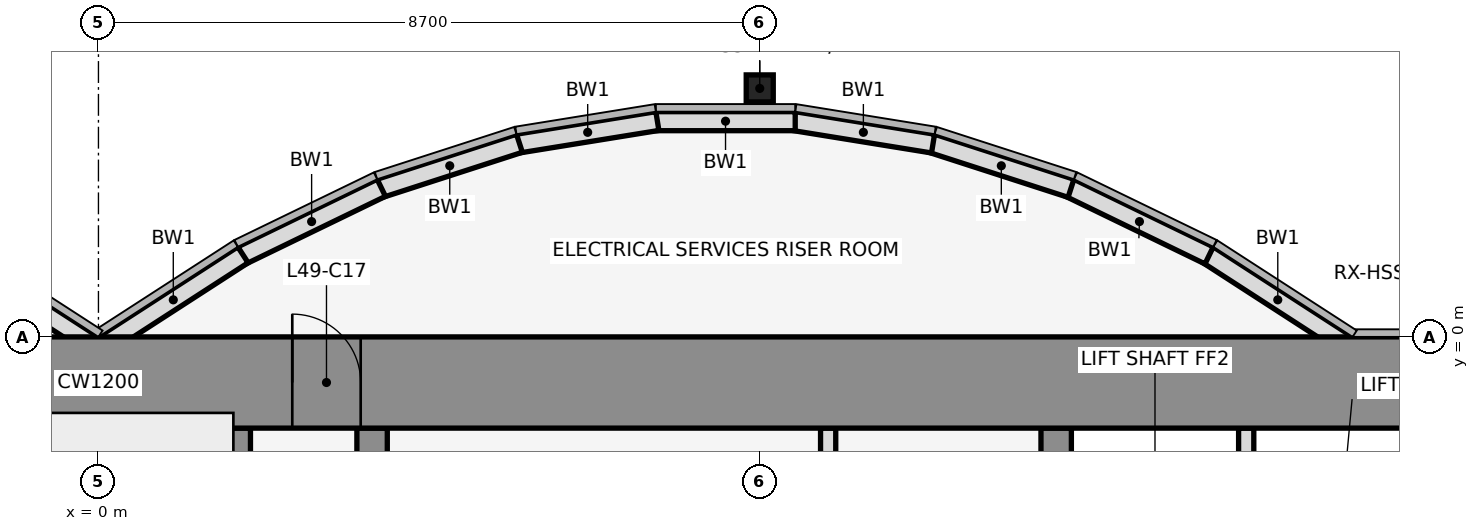
"""IFC4 building model, lengths in metres.
Left out: names, types, materials, properties, quantities, classifications, styles, units other than length and angle.
Written with IfcOpenShell. Run it as: python <this file> out.ifc"""

import sys

from ifc_helpers import new_model, si_unit, direction, frame, frame_2d, origin, origin_2d, place, context, subcontext, project, spatial, rectangle, hollow_rectangle, extrude, element, fill, save


model = new_model("IFC4")
c1 = context("Model", 3, precision=1e-05, world=origin(), true_north=direction((0.0, 1.0)))
c2 = subcontext(c1, "Body", "Model", "MODEL_VIEW")
j1 = project(units=[si_unit("LENGTHUNIT", "METRE"), si_unit("PLANEANGLEUNIT", "RADIAN")], contexts=[c1])
p1 = place(None, origin())
s1 = spatial("IfcSite", under=j1, at=p1, CompositionType="ELEMENT")
p2 = place(p1, origin())
s2 = spatial("IfcBuilding", under=s1, at=p2, CompositionType="ELEMENT")
p3 = place(p2, frame((0.0, 0.0, 219.6)))
s3 = spatial("IfcBuildingStorey", under=s2, at=p3, CompositionType="ELEMENT", Elevation=219.6)
p4 = place(p3, frame((8.7, 3.269, 0.0), z_axis=(0.0, 0.0, 1.0), x_axis=(1.0, 0.0, 0.0)))
e1 = element("IfcColumn", 1, at=p4, inside=s3, PredefinedType="COLUMN", context=c2, shape_type="SweptSolid", body=[
    extrude(hollow_rectangle(XDim=0.356, YDim=0.356, WallThickness=0.012, at=origin_2d()), origin(), (0.0, 0.0, 1.0), 4.1),
])
p5 = place(p3, frame((16.432, -0.105, 0.0), z_axis=(0.0, 0.0, 1.0), x_axis=(-0.83981312244, 0.542875602121, 0.0)))
e2 = element("IfcWall", 2, at=p5, inside=s3, PredefinedType="STANDARD", context=c2, shape_type="SweptSolid", body=[
    extrude(rectangle(XDim=2.183, YDim=0.25, at=frame_2d((1.091, 0.0))), origin(), (0.0, 0.0, 1.0), 3.95),
])
p6 = place(p3, frame((14.612, 1.073, 0.0), z_axis=(0.0, 0.0, 1.0), x_axis=(-0.89982408427, 0.436252928206, 0.0)))
e3 = element("IfcWall", 3, at=p6, inside=s3, PredefinedType="STANDARD", context=c2, shape_type="SweptSolid", body=[
    extrude(rectangle(XDim=2.038, YDim=0.25, at=frame_2d((1.019, 0.0))), origin(), (0.0, 0.0, 1.0), 3.95),
])
p7 = place(p3, frame((12.795, 1.955, 0.0), z_axis=(0.0, 0.0, 1.0), x_axis=(-0.951495806175, 0.307661714928, 0.0)))
e4 = element("IfcWall", 4, at=p7, inside=s3, PredefinedType="STANDARD", context=c2, shape_type="SweptSolid", body=[
    extrude(rectangle(XDim=1.927, YDim=0.25, at=frame_2d((0.963, 0.0))), origin(), (0.0, 0.0, 1.0), 3.95),
])
p8 = place(p3, frame((10.98, 2.543, 0.0), z_axis=(0.0, 0.0, 1.0), x_axis=(-0.987181718931, 0.159600293885, 0.0)))
e5 = element("IfcWall", 5, at=p8, inside=s3, PredefinedType="STANDARD", context=c2, shape_type="SweptSolid", body=[
    extrude(rectangle(XDim=1.857, YDim=0.25, at=frame_2d((0.929, 0.0))), origin(), (0.0, 0.0, 1.0), 3.95),
])
p9 = place(p3, frame((9.167, 2.838, 0.0), z_axis=(0.0, 0.0, 1.0), x_axis=(-1.0, 0.0, 0.0)))
e6 = element("IfcWall", 6, at=p9, inside=s3, PredefinedType="STANDARD", context=c2, shape_type="SweptSolid", body=[
    extrude(rectangle(XDim=1.833, YDim=0.25, at=frame_2d((0.917, 0.0))), origin(), (0.0, 0.0, 1.0), 3.95),
])
p10 = place(p3, frame((7.353, 2.84, 0.0), z_axis=(0.0, 0.0, 1.0), x_axis=(-0.987181718931, -0.159600293885, 0.0)))
e7 = element("IfcWall", 7, at=p10, inside=s3, PredefinedType="STANDARD", context=c2, shape_type="SweptSolid", body=[
    extrude(rectangle(XDim=1.857, YDim=0.25, at=frame_2d((0.929, 0.0))), origin(), (0.0, 0.0, 1.0), 3.95),
])
p11 = place(p3, frame((5.538, 2.548, 0.0), z_axis=(0.0, 0.0, 1.0), x_axis=(-0.951495806175, -0.307661714928, 0.0)))
e8 = element("IfcWall", 8, at=p11, inside=s3, PredefinedType="STANDARD", context=c2, shape_type="SweptSolid", body=[
    extrude(rectangle(XDim=1.927, YDim=0.25, at=frame_2d((0.963, 0.0))), origin(), (0.0, 0.0, 1.0), 3.95),
])
p12 = place(p3, frame((3.721, 1.962, 0.0), z_axis=(0.0, 0.0, 1.0), x_axis=(-0.89982408427, -0.436252928206, 0.0)))
e9 = element("IfcWall", 9, at=p12, inside=s3, PredefinedType="STANDARD", context=c2, shape_type="SweptSolid", body=[
    extrude(rectangle(XDim=2.038, YDim=0.25, at=frame_2d((1.019, 0.0))), origin(), (0.0, 0.0, 1.0), 3.95),
])
for number, where, z_axis, x_axis in (
    (10, (1.901, 1.08, 0.0), (0.0, 0.0, 1.0), (-0.84, -0.543, 0.0)),
    (11, (-0.068, -0.105, 0.0), (0.0, 0.0, 1.0), (-0.84, 0.543, 0.0)),
):
    element("IfcWall", number, at=place(p3, frame(where, z_axis=z_axis, x_axis=x_axis)), inside=s3, PredefinedType="STANDARD", context=c2, shape_type="SweptSolid", body=[
        extrude(rectangle(XDim=2.183, YDim=0.25, at=frame_2d((1.091, 0.0))), origin(), (0.0, 0.0, 1.0), 3.95),
    ])
p13 = place(p3, frame((1.8, -11.8, 0.0), z_axis=(0.0, 0.0, 1.0), x_axis=(0.0, 1.0, 0.0)))
e12 = element("IfcWall", 12, at=p13, inside=s3, PredefinedType="SHEAR", context=c2, shape_type="SweptSolid", body=[
    extrude(rectangle(XDim=10.6, YDim=0.4, at=frame_2d((5.3, 0.0))), origin(), (0.0, 0.0, 1.0), 4.1),
])
p14 = place(p3, frame((3.6, -11.8, 0.0), z_axis=(0.0, 0.0, 1.0), x_axis=(0.0, 1.0, 0.0)))
e13 = element("IfcWall", 13, at=p14, inside=s3, PredefinedType="SHEAR", context=c2, shape_type="SweptSolid", body=[
    extrude(rectangle(XDim=10.6, YDim=0.4, at=frame_2d((5.3, 0.0))), origin(), (0.0, 0.0, 1.0), 4.1),
])
p15 = place(p14, frame((1.35, 0.0, 0.0)))
e14 = element("IfcOpeningElement", 14, at=p15, cuts=e13, PredefinedType="OPENING", context=c2, shape_type="SweptSolid", body=[
    extrude(rectangle(XDim=0.9, YDim=2.1, at=frame_2d((0.45, 1.05))), frame((0.0, 0.212, 0.0), z_axis=(0.0, -1.0, 0.0), x_axis=(1.0, 0.0, 0.0)), (0.0, 0.0, 1.0), 0.424),
])
p16 = place(p3, frame((9.6, -4.6, 0.0), z_axis=(0.0, 0.0, 1.0), x_axis=(0.0, 1.0, 0.0)))
e15 = element("IfcWall", 15, at=p16, inside=s3, PredefinedType="PARTITIONING", context=c2, shape_type="SweptSolid", body=[
    extrude(rectangle(XDim=3.4, YDim=0.2, at=frame_2d((1.7, 0.0))), origin(), (0.0, 0.0, 1.0), 2.84),
])
p17 = place(p3, frame((12.6, -11.8, 0.0), z_axis=(0.0, 0.0, 1.0), x_axis=(0.0, 1.0, 0.0)))
e16 = element("IfcWall", 16, at=p17, inside=s3, PredefinedType="SHEAR", context=c2, shape_type="SweptSolid", body=[
    extrude(rectangle(XDim=10.6, YDim=0.4, at=frame_2d((5.3, 0.0))), origin(), (0.0, 0.0, 1.0), 4.1),
])
p18 = place(p17, frame((1.25, 0.0, 0.0)))
e17 = element("IfcOpeningElement", 17, at=p18, cuts=e16, PredefinedType="OPENING", context=c2, shape_type="SweptSolid", body=[
    extrude(rectangle(XDim=1.2, YDim=2.1, at=frame_2d((0.6, 1.05))), frame((0.0, 0.212, 0.0), z_axis=(0.0, -1.0, 0.0), x_axis=(1.0, 0.0, 0.0)), (0.0, 0.0, 1.0), 0.424),
])
p19 = place(p17, frame((4.75, 0.0, 0.0)))
e18 = element("IfcOpeningElement", 18, at=p19, cuts=e16, PredefinedType="OPENING", context=c2, shape_type="SweptSolid", body=[
    extrude(rectangle(XDim=1.1, YDim=2.1, at=frame_2d((0.55, 1.05))), frame((0.0, 0.212, 0.0), z_axis=(0.0, -1.0, 0.0), x_axis=(1.0, 0.0, 0.0)), (0.0, 0.0, 1.0), 0.424),
])
p20 = place(p3, frame((15.1, -4.6, 0.0), z_axis=(0.0, 0.0, 1.0), x_axis=(0.0, 1.0, 0.0)))
e19 = element("IfcWall", 19, at=p20, inside=s3, PredefinedType="PARTITIONING", context=c2, shape_type="SweptSolid", body=[
    extrude(rectangle(XDim=3.4, YDim=0.2, at=frame_2d((1.7, 0.0))), origin(), (0.0, 0.0, 1.0), 2.84),
])
p21 = place(p3, frame((-22.0, -0.6, 0.0), z_axis=(0.0, 0.0, 1.0), x_axis=(1.0, 0.0, 0.0)))
e20 = element("IfcWall", 20, at=p21, inside=s3, PredefinedType="SHEAR", context=c2, shape_type="SweptSolid", body=[
    extrude(rectangle(XDim=44.0, YDim=1.2, at=frame_2d((22.0, 0.0))), origin(), (0.0, 0.0, 1.0), 4.1),
])
p22 = place(p21, frame((18.55, 0.0, 0.0)))
e21 = element("IfcOpeningElement", 21, at=p22, cuts=e20, PredefinedType="OPENING", context=c2, shape_type="SweptSolid", body=[
    extrude(rectangle(XDim=0.9, YDim=2.1, at=frame_2d((0.45, 1.05))), frame((0.0, 0.612, 0.0), z_axis=(0.0, -1.0, 0.0), x_axis=(1.0, 0.0, 0.0)), (0.0, 0.0, 1.0), 1.224),
])
p23 = place(p21, frame((24.55, 0.0, 0.0)))
e22 = element("IfcOpeningElement", 22, at=p23, cuts=e20, PredefinedType="OPENING", context=c2, shape_type="SweptSolid", body=[
    extrude(rectangle(XDim=0.9, YDim=2.1, at=frame_2d((0.45, 1.05))), frame((0.0, 0.612, 0.0), z_axis=(0.0, -1.0, 0.0), x_axis=(1.0, 0.0, 0.0)), (0.0, 0.0, 1.0), 1.224),
])
p24 = place(p23, origin())
e23 = element("IfcDoor", 23, at=p24, inside=s3, OperationType="SINGLE_SWING_LEFT", PredefinedType="DOOR", context=c2, shape_type="SweptSolid", body=[
    extrude(rectangle(XDim=0.9, YDim=2.1, at=frame_2d((0.45, 1.05))), frame((0.0, 0.025, 0.0), z_axis=(0.0, -1.0, 0.0), x_axis=(1.0, 0.0, 0.0)), (0.0, 0.0, 1.0), 0.05),
])
fill(e22, e23)
save(model, sys.argv[1])
